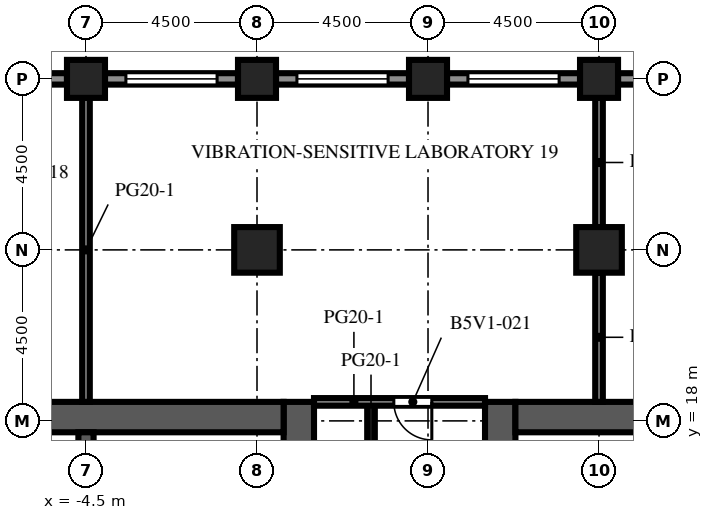
"""IFC4 building model, lengths in metres.
Left out: names, types, materials, properties, quantities, classifications, styles, units other than length and angle.
Written with IfcOpenShell. Run it as: python <this file> out.ifc"""

import sys

from ifc_helpers import new_model, si_unit, direction, frame, frame_2d, origin, origin_2d, place, context, subcontext, project, spatial, rectangle, extrude, element, fill, save


model = new_model("IFC4")
c1 = context("Model", 3, precision=1e-05, world=origin(), true_north=direction((0.0, 1.0)))
c2 = subcontext(c1, "Body", "Model", "MODEL_VIEW")
j1 = project(units=[si_unit("LENGTHUNIT", "METRE"), si_unit("PLANEANGLEUNIT", "RADIAN")], contexts=[c1])
p1 = place(None, origin())
s1 = spatial("IfcSite", under=j1, at=p1, CompositionType="ELEMENT")
p2 = place(p1, origin())
s2 = spatial("IfcBuilding", under=s1, at=p2, CompositionType="ELEMENT")
p3 = place(p2, frame((0.0, 0.0, 173.2)))
s3 = spatial("IfcBuildingStorey", under=s2, at=p3, CompositionType="ELEMENT", Elevation=173.2)
for number, where, z_axis, x_axis in (
    (1, (-4.5, 27.0, 0.0), (0.0, 0.0, 1.0), (1.0, 0.0, 0.0)),
    (2, (0.0, 27.0, 0.0), (0.0, 0.0, 1.0), (1.0, 0.0, 0.0)),
    (3, (4.5, 27.0, 0.0), (0.0, 0.0, 1.0), (1.0, 0.0, 0.0)),
    (4, (9.0, 27.0, 0.0), (0.0, 0.0, 1.0), (1.0, 0.0, 0.0)),
):
    element("IfcColumn", number, at=place(p3, frame(where, z_axis=z_axis, x_axis=x_axis)), inside=s3, PredefinedType="COLUMN", context=c2, shape_type="SweptSolid", body=[
        extrude(rectangle(XDim=1.0, YDim=1.0, at=origin_2d()), origin(), (0.0, 0.0, 1.0), 4.1),
    ])
for number, where, z_axis, x_axis in (
    (5, (0.0, 22.5, 0.0), (0.0, 0.0, 1.0), (1.0, 0.0, 0.0)),
    (6, (9.0, 22.5, 0.0), (0.0, 0.0, 1.0), (1.0, 0.0, 0.0)),
):
    element("IfcColumn", number, at=place(p3, frame(where, z_axis=z_axis, x_axis=x_axis)), inside=s3, PredefinedType="COLUMN", context=c2, shape_type="SweptSolid", body=[
        extrude(rectangle(XDim=1.2, YDim=1.2, at=origin_2d()), origin(), (0.0, 0.0, 1.0), 4.1),
    ])
p4 = place(p3, frame((1.1, -9.0, 0.0), z_axis=(0.0, 0.0, 1.0), x_axis=(0.0, 1.0, 0.0)))
e7 = element("IfcWall", 7, at=p4, inside=s3, PredefinedType="SHEAR", context=c2, shape_type="SweptSolid", body=[
    extrude(rectangle(XDim=27.5, YDim=0.8, at=frame_2d((13.75, 0.0))), origin(), (0.0, 0.0, 1.0), 4.1),
])
p5 = place(p4, frame((12.55, 0.0, 0.0)))
e8 = element("IfcOpeningElement", 8, at=p5, cuts=e7, PredefinedType="OPENING", context=c2, shape_type="SweptSolid", body=[
    extrude(rectangle(XDim=2.4, YDim=2.4, at=frame_2d((1.2, 1.2))), frame((0.0, 0.41, 0.0), z_axis=(0.0, -1.0, 0.0), x_axis=(1.0, 0.0, 0.0)), (0.0, 0.0, 1.0), 0.82),
])
p6 = place(p4, frame((3.95, 0.0, 0.0)))
e9 = element("IfcOpeningElement", 9, at=p6, cuts=e7, PredefinedType="OPENING", context=c2, shape_type="SweptSolid", body=[
    extrude(rectangle(XDim=1.2, YDim=2.1, at=frame_2d((0.6, 1.05))), frame((0.0, 0.41, 0.0), z_axis=(0.0, -1.0, 0.0), x_axis=(1.0, 0.0, 0.0)), (0.0, 0.0, 1.0), 0.82),
])
p7 = place(p4, frame((22.35, 0.0, 0.0)))
e10 = element("IfcOpeningElement", 10, at=p7, cuts=e7, PredefinedType="OPENING", context=c2, shape_type="SweptSolid", body=[
    extrude(rectangle(XDim=1.2, YDim=2.1, at=frame_2d((0.6, 1.05))), frame((0.0, 0.41, 0.0), z_axis=(0.0, -1.0, 0.0), x_axis=(1.0, 0.0, 0.0)), (0.0, 0.0, 1.0), 0.82),
])
p8 = place(p3, frame((-9.7, 18.1, 0.0), z_axis=(0.0, 0.0, 1.0), x_axis=(1.0, 0.0, 0.0)))
e11 = element("IfcWall", 11, at=p8, inside=s3, PredefinedType="SHEAR", context=c2, shape_type="SweptSolid", body=[
    extrude(rectangle(XDim=10.4, YDim=0.8, at=frame_2d((5.2, 0.0))), origin(), (0.0, 0.0, 1.0), 4.1),
])
p9 = place(p3, frame((-4.5, 10.2, 0.0), z_axis=(0.0, 0.0, 1.0), x_axis=(0.0, 1.0, 0.0)))
e12 = element("IfcWall", 12, at=p9, inside=s3, PredefinedType="SHEAR", context=c2, shape_type="SweptSolid", body=[
    extrude(rectangle(XDim=7.5, YDim=0.4, at=frame_2d((3.75, 0.0))), origin(), (0.0, 0.0, 1.0), 4.1),
])
p10 = place(p3, frame((6.4, -9.0, 0.0), z_axis=(0.0, 0.0, 1.0), x_axis=(0.0, 1.0, 0.0)))
e13 = element("IfcWall", 13, at=p10, inside=s3, PredefinedType="SHEAR", context=c2, shape_type="SweptSolid", body=[
    extrude(rectangle(XDim=27.5, YDim=0.8, at=frame_2d((13.75, 0.0))), origin(), (0.0, 0.0, 1.0), 4.1),
])
p11 = place(p10, frame((12.55, 0.0, 0.0)))
e14 = element("IfcOpeningElement", 14, at=p11, cuts=e13, PredefinedType="OPENING", context=c2, shape_type="SweptSolid", body=[
    extrude(rectangle(XDim=2.4, YDim=2.4, at=frame_2d((1.2, 1.2))), frame((0.0, 0.41, 0.0), z_axis=(0.0, -1.0, 0.0), x_axis=(1.0, 0.0, 0.0)), (0.0, 0.0, 1.0), 0.82),
])
p12 = place(p10, frame((3.95, 0.0, 0.0)))
e15 = element("IfcOpeningElement", 15, at=p12, cuts=e13, PredefinedType="OPENING", context=c2, shape_type="SweptSolid", body=[
    extrude(rectangle(XDim=1.2, YDim=2.1, at=frame_2d((0.6, 1.05))), frame((0.0, 0.41, 0.0), z_axis=(0.0, -1.0, 0.0), x_axis=(1.0, 0.0, 0.0)), (0.0, 0.0, 1.0), 0.82),
])
p13 = place(p10, frame((22.35, 0.0, 0.0)))
e16 = element("IfcOpeningElement", 16, at=p13, cuts=e13, PredefinedType="OPENING", context=c2, shape_type="SweptSolid", body=[
    extrude(rectangle(XDim=1.2, YDim=2.1, at=frame_2d((0.6, 1.05))), frame((0.0, 0.41, 0.0), z_axis=(0.0, -1.0, 0.0), x_axis=(1.0, 0.0, 0.0)), (0.0, 0.0, 1.0), 0.82),
])
p14 = place(p3, frame((6.8, 18.1, 0.0), z_axis=(0.0, 0.0, 1.0), x_axis=(1.0, 0.0, 0.0)))
e17 = element("IfcWall", 17, at=p14, inside=s3, PredefinedType="SHEAR", context=c2, shape_type="SweptSolid", body=[
    extrude(rectangle(XDim=10.4, YDim=0.8, at=frame_2d((5.2, 0.0))), origin(), (0.0, 0.0, 1.0), 4.1),
])
p15 = place(p3, frame((9.5, 27.0, 0.0), z_axis=(0.0, 0.0, 1.0), x_axis=(1.0, 0.0, 0.0)))
e18 = element("IfcWall", 18, at=p15, inside=s3, PredefinedType="SOLIDWALL", context=c2, shape_type="SweptSolid", body=[
    extrude(rectangle(XDim=3.5, YDim=0.3, at=frame_2d((1.75, 0.0))), origin(), (0.0, 0.0, 1.0), 2.85),
])
p16 = place(p15, frame((0.55, 0.0, 0.8)))
e19 = element("IfcOpeningElement", 19, at=p16, cuts=e18, PredefinedType="OPENING", context=c2, shape_type="SweptSolid", body=[
    extrude(rectangle(XDim=2.4, YDim=1.7, at=frame_2d((1.2, 0.85))), frame((0.0, 0.16, 0.0), z_axis=(0.0, -1.0, 0.0), x_axis=(1.0, 0.0, 0.0)), (0.0, 0.0, 1.0), 0.32),
])
p17 = place(p3, frame((5.0, 27.0, 0.0), z_axis=(0.0, 0.0, 1.0), x_axis=(1.0, 0.0, 0.0)))
e20 = element("IfcWall", 20, at=p17, inside=s3, PredefinedType="SOLIDWALL", context=c2, shape_type="SweptSolid", body=[
    extrude(rectangle(XDim=3.5, YDim=0.3, at=frame_2d((1.75, 0.0))), origin(), (0.0, 0.0, 1.0), 2.85),
])
p18 = place(p17, frame((0.55, 0.0, 0.8)))
e21 = element("IfcOpeningElement", 21, at=p18, cuts=e20, PredefinedType="OPENING", context=c2, shape_type="SweptSolid", body=[
    extrude(rectangle(XDim=2.4, YDim=1.7, at=frame_2d((1.2, 0.85))), frame((0.0, 0.16, 0.0), z_axis=(0.0, -1.0, 0.0), x_axis=(1.0, 0.0, 0.0)), (0.0, 0.0, 1.0), 0.32),
])
p19 = place(p3, frame((0.5, 27.0, 0.0), z_axis=(0.0, 0.0, 1.0), x_axis=(1.0, 0.0, 0.0)))
e22 = element("IfcWall", 22, at=p19, inside=s3, PredefinedType="SOLIDWALL", context=c2, shape_type="SweptSolid", body=[
    extrude(rectangle(XDim=3.5, YDim=0.3, at=frame_2d((1.75, 0.0))), origin(), (0.0, 0.0, 1.0), 2.85),
])
p20 = place(p19, frame((0.55, 0.0, 0.8)))
e23 = element("IfcOpeningElement", 23, at=p20, cuts=e22, PredefinedType="OPENING", context=c2, shape_type="SweptSolid", body=[
    extrude(rectangle(XDim=2.4, YDim=1.7, at=frame_2d((1.2, 0.85))), frame((0.0, 0.16, 0.0), z_axis=(0.0, -1.0, 0.0), x_axis=(1.0, 0.0, 0.0)), (0.0, 0.0, 1.0), 0.32),
])
p21 = place(p3, frame((-4.0, 27.0, 0.0), z_axis=(0.0, 0.0, 1.0), x_axis=(1.0, 0.0, 0.0)))
e24 = element("IfcWall", 24, at=p21, inside=s3, PredefinedType="SOLIDWALL", context=c2, shape_type="SweptSolid", body=[
    extrude(rectangle(XDim=3.5, YDim=0.3, at=frame_2d((1.75, 0.0))), origin(), (0.0, 0.0, 1.0), 2.85),
])
p22 = place(p21, frame((0.55, 0.0, 0.8)))
e25 = element("IfcOpeningElement", 25, at=p22, cuts=e24, PredefinedType="OPENING", context=c2, shape_type="SweptSolid", body=[
    extrude(rectangle(XDim=2.4, YDim=1.7, at=frame_2d((1.2, 0.85))), frame((0.0, 0.16, 0.0), z_axis=(0.0, -1.0, 0.0), x_axis=(1.0, 0.0, 0.0)), (0.0, 0.0, 1.0), 0.32),
])
p23 = place(p3, frame((-8.5, 27.0, 0.0), z_axis=(0.0, 0.0, 1.0), x_axis=(1.0, 0.0, 0.0)))
e26 = element("IfcWall", 26, at=p23, inside=s3, PredefinedType="SOLIDWALL", context=c2, shape_type="SweptSolid", body=[
    extrude(rectangle(XDim=3.5, YDim=0.3, at=frame_2d((1.75, 0.0))), origin(), (0.0, 0.0, 1.0), 2.85),
])
p24 = place(p23, frame((0.55, 0.0, 0.8)))
e27 = element("IfcOpeningElement", 27, at=p24, cuts=e26, PredefinedType="OPENING", context=c2, shape_type="SweptSolid", body=[
    extrude(rectangle(XDim=2.4, YDim=1.7, at=frame_2d((1.2, 0.85))), frame((0.0, 0.16, 0.0), z_axis=(0.0, -1.0, 0.0), x_axis=(1.0, 0.0, 0.0)), (0.0, 0.0, 1.0), 0.32),
])
p25 = place(p3, frame((-0.7, 14.85, 0.0), z_axis=(0.0, 0.0, 1.0), x_axis=(0.0, 1.0, 0.0)))
e28 = element("IfcWall", 28, at=p25, inside=s3, PredefinedType="PARTITIONING", context=c2, shape_type="SweptSolid", body=[
    extrude(rectangle(XDim=2.85, YDim=0.1, at=frame_2d((1.425, 0.0))), origin(), (0.0, 0.0, 1.0), 3.65),
])
p26 = place(p25, frame((0.925, 0.0, 0.0)))
e29 = element("IfcOpeningElement", 29, at=p26, cuts=e28, PredefinedType="OPENING", context=c2, shape_type="SweptSolid", body=[
    extrude(rectangle(XDim=1.0, YDim=2.1, at=frame_2d((0.5, 1.05))), frame((0.0, 0.06, 0.0), z_axis=(0.0, -1.0, 0.0), x_axis=(1.0, 0.0, 0.0)), (0.0, 0.0, 1.0), 0.12),
])
p27 = place(p3, frame((8.2, 14.85, 0.0), z_axis=(0.0, 0.0, 1.0), x_axis=(0.0, 1.0, 0.0)))
e30 = element("IfcWall", 30, at=p27, inside=s3, PredefinedType="PARTITIONING", context=c2, shape_type="SweptSolid", body=[
    extrude(rectangle(XDim=2.85, YDim=0.1, at=frame_2d((1.425, 0.0))), origin(), (0.0, 0.0, 1.0), 3.65),
])
p28 = place(p27, frame((0.925, 0.0, 0.0)))
e31 = element("IfcOpeningElement", 31, at=p28, cuts=e30, PredefinedType="OPENING", context=c2, shape_type="SweptSolid", body=[
    extrude(rectangle(XDim=1.0, YDim=2.1, at=frame_2d((0.5, 1.05))), frame((0.0, 0.06, 0.0), z_axis=(0.0, -1.0, 0.0), x_axis=(1.0, 0.0, 0.0)), (0.0, 0.0, 1.0), 0.12),
])
p29 = place(p3, frame((-4.5, 18.5, 0.0), z_axis=(0.0, 0.0, 1.0), x_axis=(0.0, 1.0, 0.0)))
e32 = element("IfcWall", 32, at=p29, inside=s3, PredefinedType="PARTITIONING", context=c2, shape_type="SweptSolid", body=[
    extrude(rectangle(XDim=8.0, YDim=0.2, at=frame_2d((4.0, 0.0))), origin(), (0.0, 0.0, 1.0), 3.65),
])
p30 = place(p3, frame((3.0, 6.7, 0.0), z_axis=(0.0, 0.0, 1.0), x_axis=(0.0, 1.0, 0.0)))
e33 = element("IfcWall", 33, at=p30, inside=s3, PredefinedType="PARTITIONING", context=c2, shape_type="SweptSolid", body=[
    extrude(rectangle(XDim=11.8, YDim=0.2, at=frame_2d((5.9, 0.0))), origin(), (0.0, 0.0, 1.0), 3.65),
])
p31 = place(p30, frame((5.35, 0.0, 0.0)))
e34 = element("IfcOpeningElement", 34, at=p31, cuts=e33, PredefinedType="OPENING", context=c2, shape_type="SweptSolid", body=[
    extrude(rectangle(XDim=1.0, YDim=2.1, at=frame_2d((0.5, 1.05))), frame((0.0, 0.11, 0.0), z_axis=(0.0, -1.0, 0.0), x_axis=(1.0, 0.0, 0.0)), (0.0, 0.0, 1.0), 0.22),
])
for number, where, z_axis, x_axis in (
    (35, (9.0, 18.5, 0.0), (0.0, 0.0, 1.0), (0.0, 1.0, 0.0)),
    (36, (9.0, 23.1, 0.0), (0.0, 0.0, 1.0), (0.0, 1.0, 0.0)),
):
    element("IfcWall", number, at=place(p3, frame(where, z_axis=z_axis, x_axis=x_axis)), inside=s3, PredefinedType="PARTITIONING", context=c2, shape_type="SweptSolid", body=[
        extrude(rectangle(XDim=3.4, YDim=0.2, at=frame_2d((1.7, 0.0))), origin(), (0.0, 0.0, 1.0), 3.65),
    ])
p32 = place(p3, frame((1.5, 18.5, 0.0), z_axis=(0.0, 0.0, 1.0), x_axis=(1.0, 0.0, 0.0)))
e37 = element("IfcWall", 37, at=p32, inside=s3, PredefinedType="PARTITIONING", context=c2, shape_type="SweptSolid", body=[
    extrude(rectangle(XDim=4.5, YDim=0.2, at=frame_2d((2.25, 0.0))), origin(), (0.0, 0.0, 1.0), 3.65),
])
p33 = place(p32, frame((2.1, 0.0, 0.0)))
e38 = element("IfcOpeningElement", 38, at=p33, cuts=e37, PredefinedType="OPENING", context=c2, shape_type="SweptSolid", body=[
    extrude(rectangle(XDim=1.0, YDim=2.1, at=frame_2d((0.5, 1.05))), frame((0.0, 0.11, 0.0), z_axis=(0.0, -1.0, 0.0), x_axis=(1.0, 0.0, 0.0)), (0.0, 0.0, 1.0), 0.22),
])
p34 = place(p18, origin())
e39 = element("IfcWindow", 39, at=p34, inside=s3, PartitioningType="SINGLE_PANEL", PredefinedType="WINDOW", context=c2, shape_type="SweptSolid", body=[
    extrude(rectangle(XDim=2.4, YDim=1.7, at=frame_2d((1.2, 0.85))), frame((0.0, 0.03, 0.0), z_axis=(0.0, -1.0, 0.0), x_axis=(1.0, 0.0, 0.0)), (0.0, 0.0, 1.0), 0.06),
])
fill(e21, e39)
p35 = place(p20, origin())
e40 = element("IfcWindow", 40, at=p35, inside=s3, PartitioningType="SINGLE_PANEL", PredefinedType="WINDOW", context=c2, shape_type="SweptSolid", body=[
    extrude(rectangle(XDim=2.4, YDim=1.7, at=frame_2d((1.2, 0.85))), frame((0.0, 0.03, 0.0), z_axis=(0.0, -1.0, 0.0), x_axis=(1.0, 0.0, 0.0)), (0.0, 0.0, 1.0), 0.06),
])
fill(e23, e40)
p36 = place(p22, origin())
e41 = element("IfcWindow", 41, at=p36, inside=s3, PartitioningType="SINGLE_PANEL", PredefinedType="WINDOW", context=c2, shape_type="SweptSolid", body=[
    extrude(rectangle(XDim=2.4, YDim=1.7, at=frame_2d((1.2, 0.85))), frame((0.0, 0.03, 0.0), z_axis=(0.0, -1.0, 0.0), x_axis=(1.0, 0.0, 0.0)), (0.0, 0.0, 1.0), 0.06),
])
fill(e25, e41)
p37 = place(p33, origin())
e42 = element("IfcDoor", 42, at=p37, inside=s3, OperationType="SINGLE_SWING_RIGHT", PredefinedType="DOOR", context=c2, shape_type="SweptSolid", body=[
    extrude(rectangle(XDim=1.0, YDim=2.1, at=frame_2d((0.5, 1.05))), frame((0.0, 0.025, 0.0), z_axis=(0.0, -1.0, 0.0), x_axis=(1.0, 0.0, 0.0)), (0.0, 0.0, 1.0), 0.05),
])
fill(e38, e42)
save(model, sys.argv[1])
